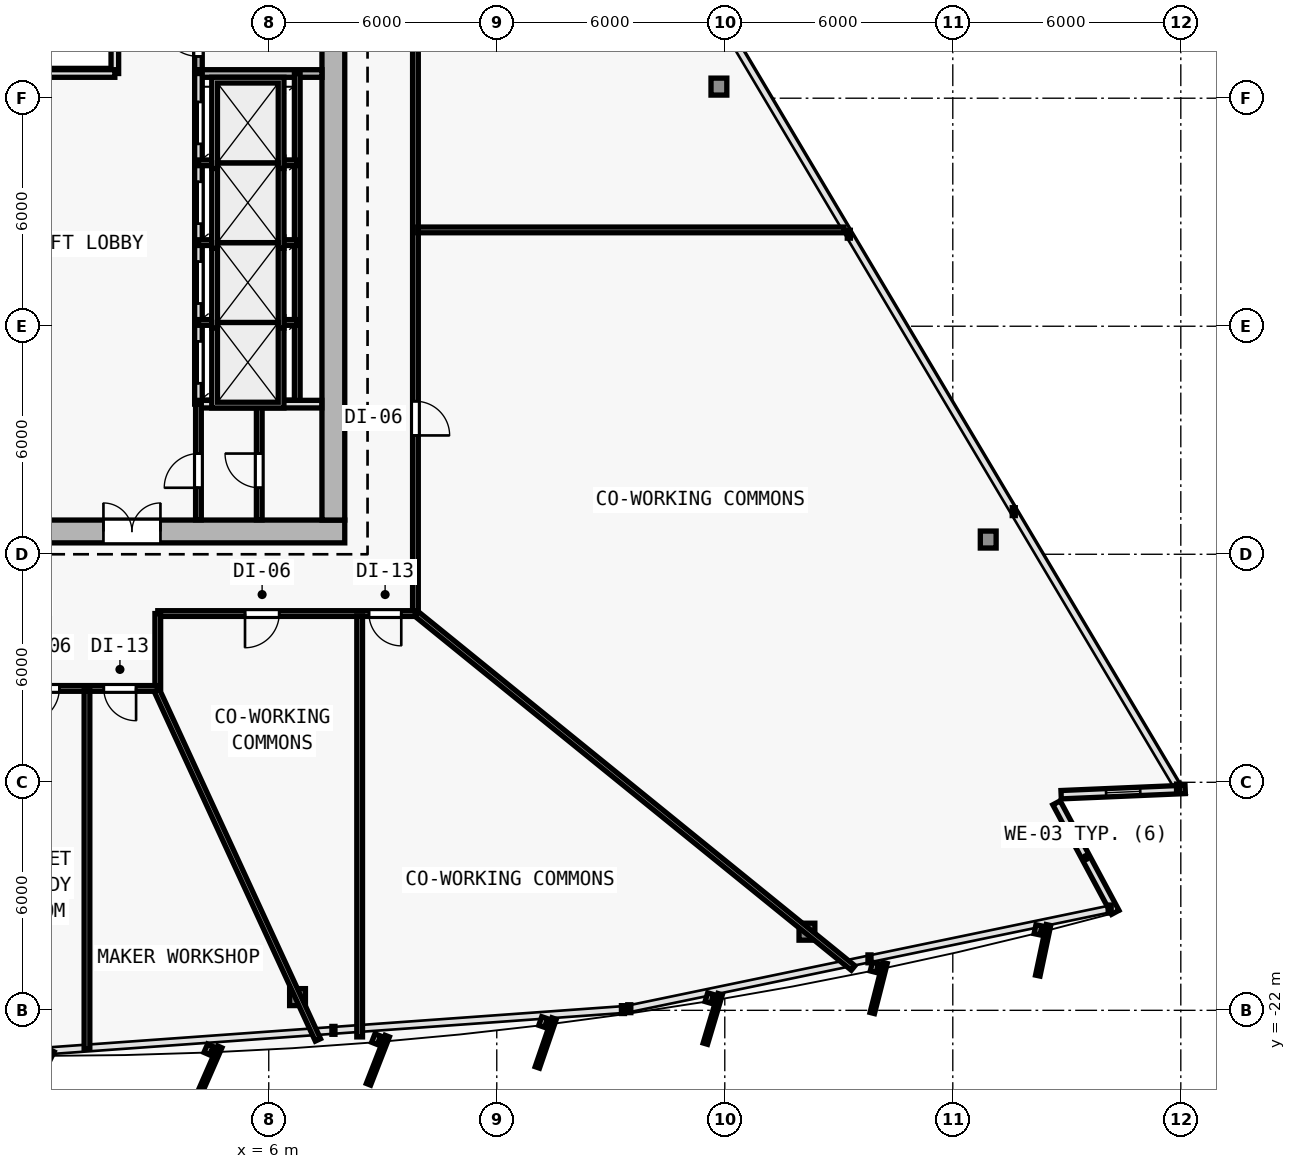
"""IFC4 building model, lengths in metres.
Left out: names, types, materials, properties, quantities, classifications, styles, units other than length and angle.
Written with IfcOpenShell. Run it as: python <this file> out.ifc"""

import sys

from ifc_helpers import new_model, si_unit, direction, frame, frame_2d, origin, origin_2d, place, context, subcontext, project, spatial, rectangle, i_section, extrude, element, fill, save


model = new_model("IFC4")
c1 = context("Model", 3, precision=1e-05, world=origin(), true_north=direction((0.0, 1.0)))
c2 = subcontext(c1, "Body", "Model", "MODEL_VIEW")
j1 = project(units=[si_unit("LENGTHUNIT", "METRE"), si_unit("PLANEANGLEUNIT", "RADIAN")], contexts=[c1])
p1 = place(None, origin())
s1 = spatial("IfcSite", under=j1, at=p1, CompositionType="ELEMENT")
p2 = place(p1, origin())
s2 = spatial("IfcBuilding", under=s1, at=p2, CompositionType="ELEMENT")
p3 = place(p2, frame((0.0, 0.0, 37.2)))
s3 = spatial("IfcBuildingStorey", under=s2, at=p3, CompositionType="ELEMENT", Elevation=37.2)
for number, where, z_axis, x_axis in (
    (1, (7.7, -9.4, 0.0), (0.0, 0.0, 1.0), (1.0, 0.0, 0.0)),
    (2, (7.7, 0.4, 0.0), (0.0, 0.0, 1.0), (1.0, 0.0, 0.0)),
):
    element("IfcColumn", number, at=place(p3, frame(where, z_axis=z_axis, x_axis=x_axis)), inside=s3, PredefinedType="COLUMN", context=c2, shape_type="SweptSolid", body=[
        extrude(i_section(OverallWidth=0.416, OverallDepth=0.446, WebThickness=0.025, FlangeThickness=0.04, FilletRadius=0.015, at=origin_2d()), origin(), (0.0, 0.0, 1.0), 3.6),
    ])
p4 = place(p3, frame((6.757, -21.652, 0.006), z_axis=(-0.006934288159, 0.035283289748, 0.999353293441), x_axis=(-0.981229659911, -0.192842823335, 0.0)))
e3 = element("IfcColumn", 3, at=p4, inside=s3, PredefinedType="COLUMN", context=c2, shape_type="SweptSolid", body=[
    extrude(i_section(OverallWidth=0.416, OverallDepth=0.446, WebThickness=0.025, FlangeThickness=0.04, FilletRadius=0.015, at=origin_2d()), origin(), (0.0, 0.0, 1.0), 3.591),
])
p5 = place(p3, frame((20.162, -19.931, 0.006), z_axis=(-0.020664238418, 0.033511412961, 0.999224686671), x_axis=(-0.851183725565, -0.524867855115, 0.0)))
e4 = element("IfcColumn", 4, at=p5, inside=s3, PredefinedType="COLUMN", context=c2, shape_type="SweptSolid", body=[
    extrude(i_section(OverallWidth=0.416, OverallDepth=0.446, WebThickness=0.025, FlangeThickness=0.04, FilletRadius=0.015, at=origin_2d()), origin(), (0.0, 0.0, 1.0), 3.592),
])
p6 = place(p3, frame((24.932, -9.613, 0.006), z_axis=(-0.026107436898, 0.021620221181, 0.999425318758), x_axis=(-0.637813971185, -0.770190455771, 0.0)))
e5 = element("IfcColumn", 5, at=p6, inside=s3, PredefinedType="COLUMN", context=c2, shape_type="SweptSolid", body=[
    extrude(i_section(OverallWidth=0.416, OverallDepth=0.446, WebThickness=0.025, FlangeThickness=0.04, FilletRadius=0.015, at=origin_2d()), origin(), (0.0, 0.0, 1.0), 3.591),
])
p7 = place(p3, frame((17.846, 2.305, 0.006), z_axis=(-0.018907326549, 0.00952167524, 0.999775900241), x_axis=(-0.449781931574, -0.893138406984, 0.0)))
e6 = element("IfcColumn", 6, at=p7, inside=s3, PredefinedType="COLUMN", context=c2, shape_type="SweptSolid", body=[
    extrude(i_section(OverallWidth=0.416, OverallDepth=0.446, WebThickness=0.025, FlangeThickness=0.04, FilletRadius=0.015, at=origin_2d()), origin(), (0.0, 0.0, 1.0), 3.59),
])
p8 = place(p3, frame((26.729, -16.54, 0.0), z_axis=(0.0, 0.0, 1.0), x_axis=(0.472830429959, -0.881153439819, 0.0)))
e7 = element("IfcWall", 7, at=p8, inside=s3, PredefinedType="SOLIDWALL", context=c2, shape_type="SweptSolid", body=[
    extrude(rectangle(XDim=3.27, YDim=0.22, at=frame_2d((1.635, 0.0))), origin(), (0.0, 0.0, 1.0), 3.35),
])
p9 = place(p3, frame((30.115, -16.188, 0.0), z_axis=(0.0, 0.0, 1.0), x_axis=(-0.999095638069, -0.042519477791, 0.0)))
e8 = element("IfcWall", 8, at=p9, inside=s3, PredefinedType="SOLIDWALL", context=c2, shape_type="SweptSolid", body=[
    extrude(rectangle(XDim=3.267, YDim=0.22, at=frame_2d((1.634, 0.0))), origin(), (0.0, 0.0, 1.0), 3.35),
])
p10 = place(p9, frame((1.184, 0.0, 0.62)))
e9 = element("IfcOpeningElement", 9, at=p10, cuts=e8, PredefinedType="OPENING", context=c2, shape_type="SweptSolid", body=[
    extrude(rectangle(XDim=0.9, YDim=1.6, at=frame_2d((0.45, 0.8))), frame((0.0, 0.12, 0.0), z_axis=(0.0, -1.0, 0.0), x_axis=(1.0, 0.0, 0.0)), (0.0, 0.0, 1.0), 0.24),
])
p11 = place(p3, frame((-8.0, -9.4, 0.0), z_axis=(0.0, 0.0, 1.0), x_axis=(1.0, 0.0, 0.0)))
e10 = element("IfcWall", 10, at=p11, inside=s3, PredefinedType="SHEAR", context=c2, shape_type="SweptSolid", body=[
    extrude(rectangle(XDim=16.0, YDim=0.6, at=frame_2d((8.0, 0.0))), origin(), (0.0, 0.0, 1.0), 3.35),
])
p12 = place(p11, frame((9.65, 0.0, 0.0)))
e11 = element("IfcOpeningElement", 11, at=p12, cuts=e10, PredefinedType="OPENING", context=c2, shape_type="SweptSolid", body=[
    extrude(rectangle(XDim=1.5, YDim=2.2, at=frame_2d((0.75, 1.1))), frame((0.0, 0.31, 0.0), z_axis=(0.0, -1.0, 0.0), x_axis=(1.0, 0.0, 0.0)), (0.0, 0.0, 1.0), 0.62),
])
p13 = place(p3, frame((7.7, 9.9, 0.0), z_axis=(0.0, 0.0, 1.0), x_axis=(0.0, -1.0, 0.0)))
e12 = element("IfcWall", 12, at=p13, inside=s3, PredefinedType="SHEAR", context=c2, shape_type="SweptSolid", body=[
    extrude(rectangle(XDim=19.0, YDim=0.6, at=frame_2d((9.5, 0.0))), origin(), (0.0, 0.0, 1.0), 3.35),
])
p14 = place(p3, frame((4.15, 2.75, 0.0), z_axis=(0.0, 0.0, 1.0), x_axis=(0.0, 1.0, 0.0)))
e13 = element("IfcWall", 13, at=p14, inside=s3, PredefinedType="SOLIDWALL", context=c2, shape_type="SweptSolid", body=[
    extrude(rectangle(XDim=7.15, YDim=0.2, at=frame_2d((3.575, 0.0))), origin(), (0.0, 0.0, 1.0), 3.35),
])
p15 = place(p14, frame((0.35, 0.0, 0.0)))
e14 = element("IfcOpeningElement", 14, at=p15, cuts=e13, PredefinedType="OPENING", context=c2, shape_type="SweptSolid", body=[
    extrude(rectangle(XDim=1.0, YDim=2.15, at=frame_2d((0.5, 1.075))), frame((0.0, 0.11, 0.0), z_axis=(0.0, -1.0, 0.0), x_axis=(1.0, 0.0, 0.0)), (0.0, 0.0, 1.0), 0.22),
])
p16 = place(p3, frame((4.05, 2.65, 0.0), z_axis=(0.0, 0.0, 1.0), x_axis=(1.0, 0.0, 0.0)))
e15 = element("IfcWall", 15, at=p16, inside=s3, PredefinedType="SOLIDWALL", context=c2, shape_type="SweptSolid", body=[
    extrude(rectangle(XDim=3.35, YDim=0.2, at=frame_2d((1.675, 0.0))), origin(), (0.0, 0.0, 1.0), 3.35),
])
p17 = place(p3, frame((4.15, -6.05, 0.0), z_axis=(0.0, 0.0, 1.0), x_axis=(0.0, 1.0, 0.0)))
e16 = element("IfcWall", 16, at=p17, inside=s3, PredefinedType="SOLIDWALL", context=c2, shape_type="SweptSolid", body=[
    extrude(rectangle(XDim=8.7, YDim=0.2, at=frame_2d((4.35, 0.0))), origin(), (0.0, 0.0, 1.0), 3.35),
])
p18 = place(p17, frame((0.55, 0.0, 0.0)))
e17 = element("IfcOpeningElement", 17, at=p18, cuts=e16, PredefinedType="OPENING", context=c2, shape_type="SweptSolid", body=[
    extrude(rectangle(XDim=1.1, YDim=2.15, at=frame_2d((0.55, 1.075))), frame((0.0, 0.11, 0.0), z_axis=(0.0, -1.0, 0.0), x_axis=(1.0, 0.0, 0.0)), (0.0, 0.0, 1.0), 0.22),
])
p19 = place(p17, frame((2.65, 0.0, 0.0)))
e18 = element("IfcOpeningElement", 18, at=p19, cuts=e16, PredefinedType="OPENING", context=c2, shape_type="SweptSolid", body=[
    extrude(rectangle(XDim=1.1, YDim=2.15, at=frame_2d((0.55, 1.075))), frame((0.0, 0.11, 0.0), z_axis=(0.0, -1.0, 0.0), x_axis=(1.0, 0.0, 0.0)), (0.0, 0.0, 1.0), 0.22),
])
p20 = place(p17, frame((4.75, 0.0, 0.0)))
e19 = element("IfcOpeningElement", 19, at=p20, cuts=e16, PredefinedType="OPENING", context=c2, shape_type="SweptSolid", body=[
    extrude(rectangle(XDim=1.1, YDim=2.15, at=frame_2d((0.55, 1.075))), frame((0.0, 0.11, 0.0), z_axis=(0.0, -1.0, 0.0), x_axis=(1.0, 0.0, 0.0)), (0.0, 0.0, 1.0), 0.22),
])
p21 = place(p17, frame((6.85, 0.0, 0.0)))
e20 = element("IfcOpeningElement", 20, at=p21, cuts=e16, PredefinedType="OPENING", context=c2, shape_type="SweptSolid", body=[
    extrude(rectangle(XDim=1.1, YDim=2.15, at=frame_2d((0.55, 1.075))), frame((0.0, 0.11, 0.0), z_axis=(0.0, -1.0, 0.0), x_axis=(1.0, 0.0, 0.0)), (0.0, 0.0, 1.0), 0.22),
])
p22 = place(p3, frame((6.75, -6.05, 0.0), z_axis=(0.0, 0.0, 1.0), x_axis=(0.0, 1.0, 0.0)))
e21 = element("IfcWall", 21, at=p22, inside=s3, PredefinedType="PARTITIONING", context=c2, shape_type="SweptSolid", body=[
    extrude(rectangle(XDim=8.7, YDim=0.15, at=frame_2d((4.35, 0.0))), origin(), (0.0, 0.0, 1.0), 3.35),
])
for number, where, z_axis, x_axis in (
    (22, (4.15, -3.9, 0.0), (0.0, 0.0, 1.0), (1.0, 0.0, 0.0)),
    (23, (4.15, -1.8, 0.0), (0.0, 0.0, 1.0), (1.0, 0.0, 0.0)),
    (24, (4.15, 0.3, 0.0), (0.0, 0.0, 1.0), (1.0, 0.0, 0.0)),
):
    element("IfcWall", number, at=place(p3, frame(where, z_axis=z_axis, x_axis=x_axis)), inside=s3, PredefinedType="PARTITIONING", context=c2, shape_type="SweptSolid", body=[
        extrude(rectangle(XDim=2.6, YDim=0.15, at=frame_2d((1.3, 0.0))), origin(), (0.0, 0.0, 1.0), 3.35),
    ])
p23 = place(p3, frame((1.95, 2.65, 0.0), z_axis=(0.0, 0.0, 1.0), x_axis=(0.0, 1.0, 0.0)))
e25 = element("IfcWall", 25, at=p23, inside=s3, PredefinedType="SOLIDWALL", context=c2, shape_type="SweptSolid", body=[
    extrude(rectangle(XDim=7.245, YDim=0.2, at=frame_2d((3.623, 0.0))), origin(), (0.0, 0.0, 1.0), 3.35),
])
p24 = place(p3, frame((-0.95, 2.65, 0.0), z_axis=(0.0, 0.0, 1.0), x_axis=(1.0, 0.0, 0.0)))
e26 = element("IfcWall", 26, at=p24, inside=s3, PredefinedType="SOLIDWALL", context=c2, shape_type="SweptSolid", body=[
    extrude(rectangle(XDim=2.9, YDim=0.2, at=frame_2d((1.45, 0.0))), origin(), (0.0, 0.0, 1.0), 3.35),
])
p25 = place(p3, frame((4.15, -6.05, 0.0), z_axis=(0.0, 0.0, 1.0), x_axis=(1.0, 0.0, 0.0)))
e27 = element("IfcWall", 27, at=p25, inside=s3, PredefinedType="SOLIDWALL", context=c2, shape_type="SweptSolid", body=[
    extrude(rectangle(XDim=3.245, YDim=0.2, at=frame_2d((1.623, 0.0))), origin(), (0.0, 0.0, 1.0), 3.35),
])
p26 = place(p3, frame((4.15, -9.095, 0.0), z_axis=(0.0, 0.0, 1.0), x_axis=(0.0, 1.0, 0.0)))
e28 = element("IfcWall", 28, at=p26, inside=s3, PredefinedType="PARTITIONING", context=c2, shape_type="SweptSolid", body=[
    extrude(rectangle(XDim=3.045, YDim=0.15, at=frame_2d((1.522, 0.0))), origin(), (0.0, 0.0, 1.0), 3.35),
])
p27 = place(p26, frame((0.845, 0.0, 0.0)))
e29 = element("IfcOpeningElement", 29, at=p27, cuts=e28, PredefinedType="OPENING", context=c2, shape_type="SweptSolid", body=[
    extrude(rectangle(XDim=0.9, YDim=2.1, at=frame_2d((0.45, 1.05))), frame((0.0, 0.085, 0.0), z_axis=(0.0, -1.0, 0.0), x_axis=(1.0, 0.0, 0.0)), (0.0, 0.0, 1.0), 0.17),
])
p28 = place(p3, frame((5.75, -9.095, 0.0), z_axis=(0.0, 0.0, 1.0), x_axis=(0.0, 1.0, 0.0)))
e30 = element("IfcWall", 30, at=p28, inside=s3, PredefinedType="PARTITIONING", context=c2, shape_type="SweptSolid", body=[
    extrude(rectangle(XDim=3.045, YDim=0.15, at=frame_2d((1.522, 0.0))), origin(), (0.0, 0.0, 1.0), 3.35),
])
p29 = place(p28, frame((0.845, 0.0, 0.0)))
e31 = element("IfcOpeningElement", 31, at=p29, cuts=e30, PredefinedType="OPENING", context=c2, shape_type="SweptSolid", body=[
    extrude(rectangle(XDim=0.9, YDim=2.1, at=frame_2d((0.45, 1.05))), frame((0.0, 0.085, 0.0), z_axis=(0.0, -1.0, 0.0), x_axis=(1.0, 0.0, 0.0)), (0.0, 0.0, 1.0), 0.17),
])
p30 = place(p3, frame((9.86, 8.426, 0.0), z_axis=(0.0, 0.0, 1.0), x_axis=(0.0, -1.0, 0.0)))
e32 = element("IfcWall", 32, at=p30, inside=s3, PredefinedType="PARTITIONING", context=c2, shape_type="SweptSolid", body=[
    extrude(rectangle(XDim=19.986, YDim=0.15, at=frame_2d((9.993, 0.0))), origin(), (0.0, 0.0, 1.0), 2.609),
])
p31 = place(p30, frame((14.399, 0.0, 0.0)))
e33 = element("IfcOpeningElement", 33, at=p31, cuts=e32, PredefinedType="OPENING", context=c2, shape_type="SweptSolid", body=[
    extrude(rectangle(XDim=0.9, YDim=2.1, at=frame_2d((0.45, 1.05))), frame((0.0, 0.085, 0.0), z_axis=(0.0, -1.0, 0.0), x_axis=(1.0, 0.0, 0.0)), (0.0, 0.0, 1.0), 0.17),
])
p32 = place(p3, frame((9.86, -11.56, 0.0), z_axis=(0.0, 0.0, 1.0), x_axis=(-1.0, 0.0, 0.0)))
e34 = element("IfcWall", 34, at=p32, inside=s3, PredefinedType="PARTITIONING", context=c2, shape_type="SweptSolid", body=[
    extrude(rectangle(XDim=6.78, YDim=0.15, at=frame_2d((3.39, 0.0))), origin(), (0.0, 0.0, 1.0), 2.609),
])
p33 = place(p32, frame((3.585, 0.0, 0.0)))
e35 = element("IfcOpeningElement", 35, at=p33, cuts=e34, PredefinedType="OPENING", context=c2, shape_type="SweptSolid", body=[
    extrude(rectangle(XDim=0.9, YDim=2.1, at=frame_2d((0.45, 1.05))), frame((0.0, 0.085, 0.0), z_axis=(0.0, -1.0, 0.0), x_axis=(1.0, 0.0, 0.0)), (0.0, 0.0, 1.0), 0.17),
])
p34 = place(p32, frame((0.373, 0.0, 0.0)))
e36 = element("IfcOpeningElement", 36, at=p34, cuts=e34, PredefinedType="OPENING", context=c2, shape_type="SweptSolid", body=[
    extrude(rectangle(XDim=0.85, YDim=2.1, at=frame_2d((0.425, 1.05))), frame((0.0, 0.085, 0.0), z_axis=(0.0, -1.0, 0.0), x_axis=(1.0, 0.0, 0.0)), (0.0, 0.0, 1.0), 0.17),
])
p35 = place(p3, frame((3.08, -11.56, 0.0), z_axis=(0.0, 0.0, 1.0), x_axis=(0.0, -1.0, 0.0)))
e37 = element("IfcWall", 37, at=p35, inside=s3, PredefinedType="PARTITIONING", context=c2, shape_type="SweptSolid", body=[
    extrude(rectangle(XDim=1.97, YDim=0.15, at=frame_2d((0.985, 0.0))), origin(), (0.0, 0.0, 1.0), 2.965),
])
p36 = place(p3, frame((3.08, -13.53, 0.0), z_axis=(0.0, 0.0, 1.0), x_axis=(-1.0, 0.0, 0.0)))
e38 = element("IfcWall", 38, at=p36, inside=s3, PredefinedType="PARTITIONING", context=c2, shape_type="SweptSolid", body=[
    extrude(rectangle(XDim=6.16, YDim=0.15, at=frame_2d((3.08, 0.0))), origin(), (0.0, 0.0, 1.0), 2.725),
])
p37 = place(p36, frame((4.69, 0.0, 0.0)))
e39 = element("IfcOpeningElement", 39, at=p37, cuts=e38, PredefinedType="OPENING", context=c2, shape_type="SweptSolid", body=[
    extrude(rectangle(XDim=0.9, YDim=2.1, at=frame_2d((0.45, 1.05))), frame((0.0, 0.085, 0.0), z_axis=(0.0, -1.0, 0.0), x_axis=(1.0, 0.0, 0.0)), (0.0, 0.0, 1.0), 0.17),
])
p38 = place(p36, frame((2.591, 0.0, 0.0)))
e40 = element("IfcOpeningElement", 40, at=p38, cuts=e38, PredefinedType="OPENING", context=c2, shape_type="SweptSolid", body=[
    extrude(rectangle(XDim=0.9, YDim=2.1, at=frame_2d((0.45, 1.05))), frame((0.0, 0.085, 0.0), z_axis=(0.0, -1.0, 0.0), x_axis=(1.0, 0.0, 0.0)), (0.0, 0.0, 1.0), 0.17),
])
p39 = place(p36, frame((0.571, 0.0, 0.0)))
e41 = element("IfcOpeningElement", 41, at=p39, cuts=e38, PredefinedType="OPENING", context=c2, shape_type="SweptSolid", body=[
    extrude(rectangle(XDim=0.85, YDim=2.1, at=frame_2d((0.425, 1.05))), frame((0.0, 0.085, 0.0), z_axis=(0.0, -1.0, 0.0), x_axis=(1.0, 0.0, 0.0)), (0.0, 0.0, 1.0), 0.17),
])
p40 = place(p3, frame((3.053, -13.579, 0.0), z_axis=(0.0, 0.0, 1.0), x_axis=(0.418565952327, -0.908186403528, 0.0)))
e42 = element("IfcWall", 42, at=p40, inside=s3, PredefinedType="PARTITIONING", context=c2, shape_type="SweptSolid", body=[
    extrude(rectangle(XDim=10.129, YDim=0.15, at=frame_2d((5.064, 0.0))), origin(), (0.0, 0.0, 1.0), 2.725),
])
p41 = place(p3, frame((9.888, -11.569, 0.0), z_axis=(0.0, 0.0, 1.0), x_axis=(0.776684167017, -0.629890232267, 0.0)))
e43 = element("IfcWall", 43, at=p41, inside=s3, PredefinedType="PARTITIONING", context=c2, shape_type="SweptSolid", body=[
    extrude(rectangle(XDim=14.792, YDim=0.15, at=frame_2d((7.396, 0.0))), origin(), (0.0, 0.0, 1.0), 2.609),
])
p42 = place(p3, frame((1.217, -13.59, 0.0), z_axis=(0.0, 0.0, 1.0), x_axis=(0.0, -1.0, 0.0)))
e44 = element("IfcWall", 44, at=p42, inside=s3, PredefinedType="PARTITIONING", context=c2, shape_type="SweptSolid", body=[
    extrude(rectangle(XDim=9.427, YDim=0.15, at=frame_2d((4.714, 0.0))), origin(), (0.0, 0.0, 1.0), 2.735),
])
p43 = place(p3, frame((8.392, -11.62, 0.0), z_axis=(0.0, 0.0, 1.0), x_axis=(0.0, -1.0, 0.0)))
e45 = element("IfcWall", 45, at=p43, inside=s3, PredefinedType="PARTITIONING", context=c2, shape_type="SweptSolid", body=[
    extrude(rectangle(XDim=11.079, YDim=0.15, at=frame_2d((5.54, 0.0))), origin(), (0.0, 0.0, 1.0), 2.735),
])
p44 = place(p3, frame((9.92, -1.465, 0.0), z_axis=(0.0, 0.0, 1.0), x_axis=(1.0, 0.0, 0.0)))
e46 = element("IfcWall", 46, at=p44, inside=s3, PredefinedType="PARTITIONING", context=c2, shape_type="SweptSolid", body=[
    extrude(rectangle(XDim=11.218, YDim=0.15, at=frame_2d((5.609, 0.0))), origin(), (0.0, 0.0, 1.0), 2.735),
])
p45 = place(p10, origin())
e47 = element("IfcWindow", 47, at=p45, inside=s3, PartitioningType="SINGLE_PANEL", PredefinedType="WINDOW", context=c2, shape_type="SweptSolid", body=[
    extrude(rectangle(XDim=0.9, YDim=1.6, at=frame_2d((0.45, 0.8))), frame((0.0, 0.03, 0.0), z_axis=(0.0, -1.0, 0.0), x_axis=(1.0, 0.0, 0.0)), (0.0, 0.0, 1.0), 0.06),
])
fill(e9, e47)
p46 = place(p12, origin())
e48 = element("IfcDoor", 48, at=p46, inside=s3, OperationType="DOUBLE_DOOR_SINGLE_SWING", PredefinedType="DOOR", context=c2, shape_type="SweptSolid", body=[
    extrude(rectangle(XDim=1.5, YDim=2.2, at=frame_2d((0.75, 1.1))), frame((0.0, 0.025, 0.0), z_axis=(0.0, -1.0, 0.0), x_axis=(1.0, 0.0, 0.0)), (0.0, 0.0, 1.0), 0.05),
])
fill(e11, e48)
p47 = place(p15, origin())
e49 = element("IfcDoor", 49, at=p47, inside=s3, OperationType="SINGLE_SWING_RIGHT", PredefinedType="DOOR", context=c2, shape_type="SweptSolid", body=[
    extrude(rectangle(XDim=1.0, YDim=2.15, at=frame_2d((0.5, 1.075))), frame((0.0, 0.025, 0.0), z_axis=(0.0, -1.0, 0.0), x_axis=(1.0, 0.0, 0.0)), (0.0, 0.0, 1.0), 0.05),
])
fill(e14, e49)
p48 = place(p18, origin())
e50 = element("IfcDoor", 50, at=p48, inside=s3, OperationType="DOUBLE_DOOR_SLIDING", PredefinedType="DOOR", context=c2, shape_type="SweptSolid", body=[
    extrude(rectangle(XDim=1.1, YDim=2.15, at=frame_2d((0.55, 1.075))), frame((0.0, 0.025, 0.0), z_axis=(0.0, -1.0, 0.0), x_axis=(1.0, 0.0, 0.0)), (0.0, 0.0, 1.0), 0.05),
])
fill(e17, e50)
p49 = place(p19, origin())
e51 = element("IfcDoor", 51, at=p49, inside=s3, OperationType="DOUBLE_DOOR_SLIDING", PredefinedType="DOOR", context=c2, shape_type="SweptSolid", body=[
    extrude(rectangle(XDim=1.1, YDim=2.15, at=frame_2d((0.55, 1.075))), frame((0.0, 0.025, 0.0), z_axis=(0.0, -1.0, 0.0), x_axis=(1.0, 0.0, 0.0)), (0.0, 0.0, 1.0), 0.05),
])
fill(e18, e51)
p50 = place(p20, origin())
e52 = element("IfcDoor", 52, at=p50, inside=s3, OperationType="DOUBLE_DOOR_SLIDING", PredefinedType="DOOR", context=c2, shape_type="SweptSolid", body=[
    extrude(rectangle(XDim=1.1, YDim=2.15, at=frame_2d((0.55, 1.075))), frame((0.0, 0.025, 0.0), z_axis=(0.0, -1.0, 0.0), x_axis=(1.0, 0.0, 0.0)), (0.0, 0.0, 1.0), 0.05),
])
fill(e19, e52)
p51 = place(p21, origin())
e53 = element("IfcDoor", 53, at=p51, inside=s3, OperationType="DOUBLE_DOOR_SLIDING", PredefinedType="DOOR", context=c2, shape_type="SweptSolid", body=[
    extrude(rectangle(XDim=1.1, YDim=2.15, at=frame_2d((0.55, 1.075))), frame((0.0, 0.025, 0.0), z_axis=(0.0, -1.0, 0.0), x_axis=(1.0, 0.0, 0.0)), (0.0, 0.0, 1.0), 0.05),
])
fill(e20, e53)
p52 = place(p27, origin())
e54 = element("IfcDoor", 54, at=p52, inside=s3, OperationType="SINGLE_SWING_LEFT", PredefinedType="DOOR", context=c2, shape_type="SweptSolid", body=[
    extrude(rectangle(XDim=0.9, YDim=2.1, at=frame_2d((0.45, 1.05))), frame((0.0, 0.025, 0.0), z_axis=(0.0, -1.0, 0.0), x_axis=(1.0, 0.0, 0.0)), (0.0, 0.0, 1.0), 0.05),
])
fill(e29, e54)
p53 = place(p29, origin())
e55 = element("IfcDoor", 55, at=p53, inside=s3, OperationType="SINGLE_SWING_RIGHT", PredefinedType="DOOR", context=c2, shape_type="SweptSolid", body=[
    extrude(rectangle(XDim=0.9, YDim=2.1, at=frame_2d((0.45, 1.05))), frame((0.0, 0.025, 0.0), z_axis=(0.0, -1.0, 0.0), x_axis=(1.0, 0.0, 0.0)), (0.0, 0.0, 1.0), 0.05),
])
fill(e31, e55)
p54 = place(p38, origin())
e56 = element("IfcDoor", 56, at=p54, inside=s3, OperationType="SINGLE_SWING_RIGHT", PredefinedType="DOOR", context=c2, shape_type="SweptSolid", body=[
    extrude(rectangle(XDim=0.9, YDim=2.1, at=frame_2d((0.45, 1.05))), frame((0.0, 0.025, 0.0), z_axis=(0.0, -1.0, 0.0), x_axis=(1.0, 0.0, 0.0)), (0.0, 0.0, 1.0), 0.05),
])
fill(e40, e56)
p55 = place(p39, origin())
e57 = element("IfcDoor", 57, at=p55, inside=s3, OperationType="SINGLE_SWING_LEFT", PredefinedType="DOOR", context=c2, shape_type="SweptSolid", body=[
    extrude(rectangle(XDim=0.85, YDim=2.1, at=frame_2d((0.425, 1.05))), frame((0.0, 0.025, 0.0), z_axis=(0.0, -1.0, 0.0), x_axis=(1.0, 0.0, 0.0)), (0.0, 0.0, 1.0), 0.05),
])
fill(e41, e57)
p56 = place(p33, origin())
e58 = element("IfcDoor", 58, at=p56, inside=s3, OperationType="SINGLE_SWING_RIGHT", PredefinedType="DOOR", context=c2, shape_type="SweptSolid", body=[
    extrude(rectangle(XDim=0.9, YDim=2.1, at=frame_2d((0.45, 1.05))), frame((0.0, 0.025, 0.0), z_axis=(0.0, -1.0, 0.0), x_axis=(1.0, 0.0, 0.0)), (0.0, 0.0, 1.0), 0.05),
])
fill(e35, e58)
p57 = place(p34, origin())
e59 = element("IfcDoor", 59, at=p57, inside=s3, OperationType="SINGLE_SWING_LEFT", PredefinedType="DOOR", context=c2, shape_type="SweptSolid", body=[
    extrude(rectangle(XDim=0.85, YDim=2.1, at=frame_2d((0.425, 1.05))), frame((0.0, 0.025, 0.0), z_axis=(0.0, -1.0, 0.0), x_axis=(1.0, 0.0, 0.0)), (0.0, 0.0, 1.0), 0.05),
])
fill(e36, e59)
p58 = place(p31, origin())
e60 = element("IfcDoor", 60, at=p58, inside=s3, OperationType="SINGLE_SWING_RIGHT", PredefinedType="DOOR", context=c2, shape_type="SweptSolid", body=[
    extrude(rectangle(XDim=0.9, YDim=2.1, at=frame_2d((0.45, 1.05))), frame((0.0, 0.025, 0.0), z_axis=(0.0, -1.0, 0.0), x_axis=(1.0, 0.0, 0.0)), (0.0, 0.0, 1.0), 0.05),
])
fill(e33, e60)
save(model, sys.argv[1])
